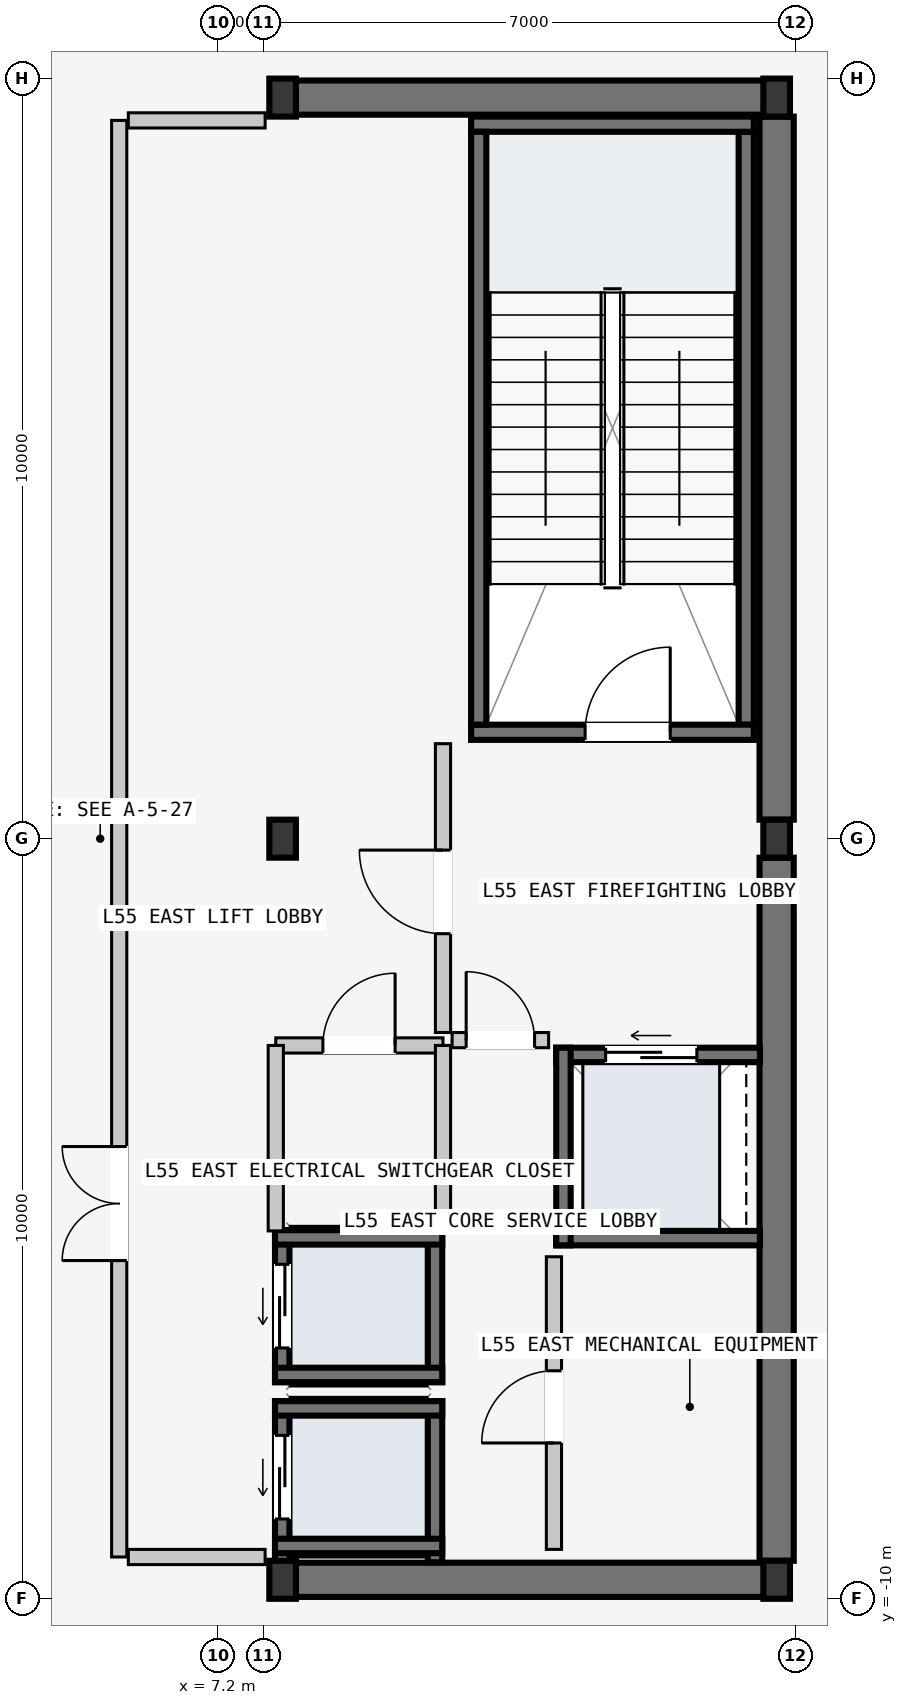
"""IFC4 building model, lengths in metres.
Left out: names, types, materials, properties, quantities, classifications, styles, units other than length and angle.
Written with IfcOpenShell. Run it as: python <this file> out.ifc"""

import sys

from ifc_helpers import new_model, si_unit, direction, frame, frame_2d, origin, origin_2d, place, context, subcontext, project, spatial, rectangle, i_section, extrude, element, fill, save


model = new_model("IFC4")
c1 = context("Model", 3, precision=1e-05, world=origin(), true_north=direction((0.0, 1.0)))
c2 = subcontext(c1, "Body", "Model", "MODEL_VIEW")
j1 = project(units=[si_unit("LENGTHUNIT", "METRE"), si_unit("PLANEANGLEUNIT", "RADIAN")], contexts=[c1])
p1 = place(None, origin())
s1 = spatial("IfcSite", under=j1, at=p1, CompositionType="ELEMENT")
p2 = place(p1, origin())
s2 = spatial("IfcBuilding", under=s1, at=p2, CompositionType="ELEMENT")
p3 = place(p2, frame((0.0, 0.0, 209.1)))
s3 = spatial("IfcBuildingStorey", under=s2, at=p3, CompositionType="ELEMENT", Elevation=209.1)
for number, where, z_axis, x_axis in (
    (1, (8.07, -9.75, -0.2), (0.0, 0.0, 1.0), (1.0, 0.0, 0.0)),
    (2, (8.07, 9.75, -0.2), (0.0, 0.0, 1.0), (1.0, 0.0, 0.0)),
):
    element("IfcWall", number, at=place(p3, frame(where, z_axis=z_axis, x_axis=x_axis)), inside=s3, PredefinedType="SHEAR", context=c2, shape_type="SweptSolid", body=[
        extrude(rectangle(XDim=6.46, YDim=0.45, at=frame_2d((3.23, 0.0))), origin(), (0.0, 0.0, 1.0), 4.8),
    ])
for number, where, z_axis, x_axis in (
    (3, (14.55, -9.5, -0.2), (0.0, 0.0, 1.0), (0.0, 1.0, 0.0)),
    (4, (14.55, 0.25, -0.2), (0.0, 0.0, 1.0), (0.0, 1.0, 0.0)),
):
    element("IfcWall", number, at=place(p3, frame(where, z_axis=z_axis, x_axis=x_axis)), inside=s3, PredefinedType="SHEAR", context=c2, shape_type="SweptSolid", body=[
        extrude(rectangle(XDim=9.25, YDim=0.45, at=frame_2d((4.625, 0.0))), origin(), (0.0, 0.0, 1.0), 4.8),
    ])
p4 = place(p3, frame((14.15, 1.5, -0.2), z_axis=(0.0, 0.0, 1.0), x_axis=(0.0, 1.0, 0.0)))
e5 = element("IfcWall", 5, at=p4, inside=s3, PredefinedType="SOLIDWALL", context=c2, shape_type="SweptSolid", body=[
    extrude(rectangle(XDim=7.8, YDim=0.2, at=frame_2d((3.9, 0.0))), origin(), (0.0, 0.0, 1.0), 4.8),
])
p5 = place(p3, frame((10.53, 1.4, -0.2), z_axis=(0.0, 0.0, 1.0), x_axis=(1.0, 0.0, 0.0)))
e6 = element("IfcWall", 6, at=p5, inside=s3, PredefinedType="SOLIDWALL", context=c2, shape_type="SweptSolid", body=[
    extrude(rectangle(XDim=3.72, YDim=0.2, at=frame_2d((1.86, 0.0))), origin(), (0.0, 0.0, 1.0), 4.8),
])
p6 = place(p5, frame((1.5, 0.0, 0.2)))
e7 = element("IfcOpeningElement", 7, at=p6, cuts=e6, PredefinedType="OPENING", context=c2, shape_type="SweptSolid", body=[
    extrude(rectangle(XDim=1.12, YDim=2.18, at=frame_2d((0.56, 1.09))), frame((0.0, 0.11, 0.0), z_axis=(0.0, -1.0, 0.0), x_axis=(1.0, 0.0, 0.0)), (0.0, 0.0, 1.0), 0.22),
])
p7 = place(p3, frame((10.53, 9.4, -0.2), z_axis=(0.0, 0.0, 1.0), x_axis=(1.0, 0.0, 0.0)))
e8 = element("IfcWall", 8, at=p7, inside=s3, PredefinedType="SOLIDWALL", context=c2, shape_type="SweptSolid", body=[
    extrude(rectangle(XDim=3.72, YDim=0.2, at=frame_2d((1.86, 0.0))), origin(), (0.0, 0.0, 1.0), 4.8),
])
p8 = place(p3, frame((10.63, 1.5, -0.2), z_axis=(0.0, 0.0, 1.0), x_axis=(0.0, 1.0, 0.0)))
e9 = element("IfcWall", 9, at=p8, inside=s3, PredefinedType="SOLIDWALL", context=c2, shape_type="SweptSolid", body=[
    extrude(rectangle(XDim=7.8, YDim=0.2, at=frame_2d((3.9, 0.0))), origin(), (0.0, 0.0, 1.0), 4.8),
])
for number, where, z_axis, x_axis in (
    (10, (8.05, -9.75, 0.0), (0.0, 0.0, 1.0), (1.0, 0.0, 0.0)),
    (11, (8.05, 0.0, 0.0), (0.0, 0.0, 1.0), (1.0, 0.0, 0.0)),
    (12, (8.05, 9.75, 0.0), (0.0, 0.0, 1.0), (1.0, 0.0, 0.0)),
    (13, (14.55, -9.75, 0.0), (0.0, 0.0, 1.0), (1.0, 0.0, 0.0)),
    (14, (14.55, 0.0, 0.0), (0.0, 0.0, 1.0), (1.0, 0.0, 0.0)),
    (15, (14.55, 9.75, 0.0), (0.0, 0.0, 1.0), (1.0, 0.0, 0.0)),
):
    element("IfcColumn", number, at=place(p3, frame(where, z_axis=z_axis, x_axis=x_axis)), inside=s3, PredefinedType="COLUMN", context=c2, shape_type="SweptSolid", body=[
        extrude(i_section(OverallWidth=0.35, OverallDepth=0.5, WebThickness=0.02, FlangeThickness=0.032, at=origin_2d()), origin(), (0.0, 0.0, 1.0), 4.8),
    ])
p9 = place(p3, frame((8.045, -9.52, -0.2), z_axis=(0.0, 0.0, 1.0), x_axis=(0.0, 1.0, 0.0)))
e16 = element("IfcWall", 16, at=p9, inside=s3, PredefinedType="SOLIDWALL", context=c2, shape_type="SweptSolid", body=[
    extrude(rectangle(XDim=2.12, YDim=0.19, at=frame_2d((1.06, 0.0))), origin(), (0.0, 0.0, 1.0), 4.8),
])
p10 = place(p9, frame((0.57, 0.0, 0.2)))
e17 = element("IfcOpeningElement", 17, at=p10, cuts=e16, PredefinedType="OPENING", context=c2, shape_type="SweptSolid", body=[
    extrude(rectangle(XDim=1.1, YDim=2.2, at=frame_2d((0.55, 1.1))), frame((0.0, 0.105, 0.0), z_axis=(0.0, -1.0, 0.0), x_axis=(1.0, 0.0, 0.0)), (0.0, 0.0, 1.0), 0.21),
])
p11 = place(p3, frame((10.055, -9.52, -0.2), z_axis=(0.0, 0.0, 1.0), x_axis=(0.0, 1.0, 0.0)))
e18 = element("IfcWall", 18, at=p11, inside=s3, PredefinedType="SOLIDWALL", context=c2, shape_type="SweptSolid", body=[
    extrude(rectangle(XDim=2.12, YDim=0.19, at=frame_2d((1.06, 0.0))), origin(), (0.0, 0.0, 1.0), 4.8),
])
for number, where, z_axis, x_axis in (
    (19, (7.95, -7.495, -0.2), (0.0, 0.0, 1.0), (1.0, 0.0, 0.0)),
    (20, (7.95, -9.305, -0.2), (0.0, 0.0, 1.0), (1.0, 0.0, 0.0)),
):
    element("IfcWall", number, at=place(p3, frame(where, z_axis=z_axis, x_axis=x_axis)), inside=s3, PredefinedType="SOLIDWALL", context=c2, shape_type="SweptSolid", body=[
        extrude(rectangle(XDim=2.2, YDim=0.19, at=frame_2d((1.1, 0.0))), origin(), (0.0, 0.0, 1.0), 4.8),
    ])
p12 = place(p3, frame((8.045, -7.15, -0.2), z_axis=(0.0, 0.0, 1.0), x_axis=(0.0, 1.0, 0.0)))
e21 = element("IfcWall", 21, at=p12, inside=s3, PredefinedType="SOLIDWALL", context=c2, shape_type="SweptSolid", body=[
    extrude(rectangle(XDim=2.0, YDim=0.19, at=frame_2d((1.0, 0.0))), origin(), (0.0, 0.0, 1.0), 4.8),
])
p13 = place(p12, frame((0.45, 0.0, 0.2)))
e22 = element("IfcOpeningElement", 22, at=p13, cuts=e21, PredefinedType="OPENING", context=c2, shape_type="SweptSolid", body=[
    extrude(rectangle(XDim=1.1, YDim=2.2, at=frame_2d((0.55, 1.1))), frame((0.0, 0.105, 0.0), z_axis=(0.0, -1.0, 0.0), x_axis=(1.0, 0.0, 0.0)), (0.0, 0.0, 1.0), 0.21),
])
p14 = place(p3, frame((10.055, -7.15, -0.2), z_axis=(0.0, 0.0, 1.0), x_axis=(0.0, 1.0, 0.0)))
e23 = element("IfcWall", 23, at=p14, inside=s3, PredefinedType="SOLIDWALL", context=c2, shape_type="SweptSolid", body=[
    extrude(rectangle(XDim=2.0, YDim=0.19, at=frame_2d((1.0, 0.0))), origin(), (0.0, 0.0, 1.0), 4.8),
])
for number, where, z_axis, x_axis in (
    (24, (7.95, -5.245, -0.2), (0.0, 0.0, 1.0), (1.0, 0.0, 0.0)),
    (25, (7.95, -7.055, -0.2), (0.0, 0.0, 1.0), (1.0, 0.0, 0.0)),
):
    element("IfcWall", number, at=place(p3, frame(where, z_axis=z_axis, x_axis=x_axis)), inside=s3, PredefinedType="SOLIDWALL", context=c2, shape_type="SweptSolid", body=[
        extrude(rectangle(XDim=2.2, YDim=0.19, at=frame_2d((1.1, 0.0))), origin(), (0.0, 0.0, 1.0), 4.8),
    ])
p15 = place(p3, frame((11.65, -2.845, -0.2), z_axis=(0.0, 0.0, 1.0), x_axis=(1.0, 0.0, 0.0)))
e26 = element("IfcWall", 26, at=p15, inside=s3, PredefinedType="SOLIDWALL", context=c2, shape_type="SweptSolid", body=[
    extrude(rectangle(XDim=2.68, YDim=0.19, at=frame_2d((1.34, 0.0))), origin(), (0.0, 0.0, 1.0), 4.8),
])
p16 = place(p15, frame((0.65, 0.0, 0.2)))
e27 = element("IfcOpeningElement", 27, at=p16, cuts=e26, PredefinedType="OPENING", context=c2, shape_type="SweptSolid", body=[
    extrude(rectangle(XDim=1.2, YDim=2.2, at=frame_2d((0.6, 1.1))), frame((0.0, 0.105, 0.0), z_axis=(0.0, -1.0, 0.0), x_axis=(1.0, 0.0, 0.0)), (0.0, 0.0, 1.0), 0.21),
])
p17 = place(p3, frame((11.65, -5.255, -0.2), z_axis=(0.0, 0.0, 1.0), x_axis=(1.0, 0.0, 0.0)))
e28 = element("IfcWall", 28, at=p17, inside=s3, PredefinedType="SOLIDWALL", context=c2, shape_type="SweptSolid", body=[
    extrude(rectangle(XDim=2.68, YDim=0.19, at=frame_2d((1.34, 0.0))), origin(), (0.0, 0.0, 1.0), 4.8),
])
p18 = place(p3, frame((11.745, -5.35, -0.2), z_axis=(0.0, 0.0, 1.0), x_axis=(0.0, 1.0, 0.0)))
e29 = element("IfcWall", 29, at=p18, inside=s3, PredefinedType="SOLIDWALL", context=c2, shape_type="SweptSolid", body=[
    extrude(rectangle(XDim=2.6, YDim=0.19, at=frame_2d((1.3, 0.0))), origin(), (0.0, 0.0, 1.0), 4.8),
])
p19 = place(p3, frame((5.9, -9.45, 0.0), z_axis=(0.0, 0.0, 1.0), x_axis=(0.0, 1.0, 0.0)))
e30 = element("IfcWall", 30, at=p19, inside=s3, PredefinedType="PARTITIONING", context=c2, shape_type="SweptSolid", body=[
    extrude(rectangle(XDim=18.9, YDim=0.2, at=frame_2d((9.45, 0.0))), origin(), (0.0, 0.0, 1.0), 4.6),
])
p20 = place(p19, frame((3.9, 0.0, 0.0)))
e31 = element("IfcOpeningElement", 31, at=p20, cuts=e30, PredefinedType="OPENING", context=c2, shape_type="SweptSolid", body=[
    extrude(rectangle(XDim=1.5, YDim=2.2, at=frame_2d((0.75, 1.1))), frame((0.0, 0.11, 0.0), z_axis=(0.0, -1.0, 0.0), x_axis=(1.0, 0.0, 0.0)), (0.0, 0.0, 1.0), 0.22),
])
for number, where, z_axis, x_axis in (
    (32, (6.02, -9.45, 0.0), (0.0, 0.0, 1.0), (1.0, 0.0, 0.0)),
    (33, (6.02, 9.45, 0.0), (0.0, 0.0, 1.0), (1.0, 0.0, 0.0)),
):
    element("IfcWall", number, at=place(p3, frame(where, z_axis=z_axis, x_axis=x_axis)), inside=s3, PredefinedType="PARTITIONING", context=c2, shape_type="SweptSolid", body=[
        extrude(rectangle(XDim=1.8, YDim=0.2, at=frame_2d((0.9, 0.0))), origin(), (0.0, 0.0, 1.0), 2.96),
    ])
p21 = place(p3, frame((10.16, -2.55, 0.0), z_axis=(0.0, 0.0, 1.0), x_axis=(0.0, 1.0, 0.0)))
e34 = element("IfcWall", 34, at=p21, inside=s3, PredefinedType="PARTITIONING", context=c2, shape_type="SweptSolid", body=[
    extrude(rectangle(XDim=3.8, YDim=0.2, at=frame_2d((1.9, 0.0))), origin(), (0.0, 0.0, 1.0), 4.6),
])
p22 = place(p21, frame((1.3, 0.0, 0.0)))
e35 = element("IfcOpeningElement", 35, at=p22, cuts=e34, PredefinedType="OPENING", context=c2, shape_type="SweptSolid", body=[
    extrude(rectangle(XDim=1.1, YDim=2.15, at=frame_2d((0.55, 1.075))), frame((0.0, 0.11, 0.0), z_axis=(0.0, -1.0, 0.0), x_axis=(1.0, 0.0, 0.0)), (0.0, 0.0, 1.0), 0.22),
])
p23 = place(p3, frame((10.28, -2.65, 0.0), z_axis=(0.0, 0.0, 1.0), x_axis=(1.0, 0.0, 0.0)))
e36 = element("IfcWall", 36, at=p23, inside=s3, PredefinedType="PARTITIONING", context=c2, shape_type="SweptSolid", body=[
    extrude(rectangle(XDim=1.27, YDim=0.2, at=frame_2d((0.635, 0.0))), origin(), (0.0, 0.0, 1.0), 4.6),
])
p24 = place(p23, frame((0.185, 0.0, 0.0)))
e37 = element("IfcOpeningElement", 37, at=p24, cuts=e36, PredefinedType="OPENING", context=c2, shape_type="SweptSolid", body=[
    extrude(rectangle(XDim=0.9, YDim=2.15, at=frame_2d((0.45, 1.075))), frame((0.0, 0.11, 0.0), z_axis=(0.0, -1.0, 0.0), x_axis=(1.0, 0.0, 0.0)), (0.0, 0.0, 1.0), 0.22),
])
p25 = place(p3, frame((7.96, -2.72, 0.0), z_axis=(0.0, 0.0, 1.0), x_axis=(1.0, 0.0, 0.0)))
e38 = element("IfcWall", 38, at=p25, inside=s3, PredefinedType="PARTITIONING", context=c2, shape_type="SweptSolid", body=[
    extrude(rectangle(XDim=2.2, YDim=0.2, at=frame_2d((1.1, 0.0))), origin(), (0.0, 0.0, 1.0), 4.6),
])
p26 = place(p25, frame((0.62, 0.0, 0.0)))
e39 = element("IfcOpeningElement", 39, at=p26, cuts=e38, PredefinedType="OPENING", context=c2, shape_type="SweptSolid", body=[
    extrude(rectangle(XDim=0.95, YDim=2.1, at=frame_2d((0.475, 1.05))), frame((0.0, 0.11, 0.0), z_axis=(0.0, -1.0, 0.0), x_axis=(1.0, 0.0, 0.0)), (0.0, 0.0, 1.0), 0.22),
])
for number, where, z_axis, x_axis in (
    (40, (7.96, -5.16, 0.0), (0.0, 0.0, 1.0), (0.0, 1.0, 0.0)),
    (41, (10.16, -5.16, 0.0), (0.0, 0.0, 1.0), (0.0, 1.0, 0.0)),
):
    element("IfcWall", number, at=place(p3, frame(where, z_axis=z_axis, x_axis=x_axis)), inside=s3, PredefinedType="PARTITIONING", context=c2, shape_type="SweptSolid", body=[
        extrude(rectangle(XDim=2.44, YDim=0.2, at=frame_2d((1.22, 0.0))), origin(), (0.0, 0.0, 1.0), 4.6),
    ])
p27 = place(p3, frame((11.62, -9.35, 0.0), z_axis=(0.0, 0.0, 1.0), x_axis=(0.0, 1.0, 0.0)))
e42 = element("IfcWall", 42, at=p27, inside=s3, PredefinedType="PARTITIONING", context=c2, shape_type="SweptSolid", body=[
    extrude(rectangle(XDim=3.85, YDim=0.2, at=frame_2d((1.925, 0.0))), origin(), (0.0, 0.0, 1.0), 4.6),
])
p28 = place(p27, frame((1.4, 0.0, 0.0)))
e43 = element("IfcOpeningElement", 43, at=p28, cuts=e42, PredefinedType="OPENING", context=c2, shape_type="SweptSolid", body=[
    extrude(rectangle(XDim=0.95, YDim=2.1, at=frame_2d((0.475, 1.05))), frame((0.0, 0.11, 0.0), z_axis=(0.0, -1.0, 0.0), x_axis=(1.0, 0.0, 0.0)), (0.0, 0.0, 1.0), 0.22),
])
p29 = place(p6, origin())
e44 = element("IfcDoor", 44, at=p29, inside=s3, OperationType="SINGLE_SWING_RIGHT", PredefinedType="DOOR", context=c2, shape_type="SweptSolid", body=[
    extrude(rectangle(XDim=1.12, YDim=2.18, at=frame_2d((0.56, 1.09))), frame((0.0, 0.025, 0.0), z_axis=(0.0, -1.0, 0.0), x_axis=(1.0, 0.0, 0.0)), (0.0, 0.0, 1.0), 0.05),
])
fill(e7, e44)
p30 = place(p10, origin())
e45 = element("IfcDoor", 45, at=p30, inside=s3, OperationType="SLIDING_TO_LEFT", PredefinedType="DOOR", context=c2, shape_type="SweptSolid", body=[
    extrude(rectangle(XDim=1.1, YDim=2.2, at=frame_2d((0.55, 1.1))), frame((0.0, 0.025, 0.0), z_axis=(0.0, -1.0, 0.0), x_axis=(1.0, 0.0, 0.0)), (0.0, 0.0, 1.0), 0.05),
])
fill(e17, e45)
p31 = place(p13, origin())
e46 = element("IfcDoor", 46, at=p31, inside=s3, OperationType="SLIDING_TO_LEFT", PredefinedType="DOOR", context=c2, shape_type="SweptSolid", body=[
    extrude(rectangle(XDim=1.1, YDim=2.2, at=frame_2d((0.55, 1.1))), frame((0.0, 0.025, 0.0), z_axis=(0.0, -1.0, 0.0), x_axis=(1.0, 0.0, 0.0)), (0.0, 0.0, 1.0), 0.05),
])
fill(e22, e46)
p32 = place(p16, origin())
e47 = element("IfcDoor", 47, at=p32, inside=s3, OperationType="SLIDING_TO_LEFT", PredefinedType="DOOR", context=c2, shape_type="SweptSolid", body=[
    extrude(rectangle(XDim=1.2, YDim=2.2, at=frame_2d((0.6, 1.1))), frame((0.0, 0.025, 0.0), z_axis=(0.0, -1.0, 0.0), x_axis=(1.0, 0.0, 0.0)), (0.0, 0.0, 1.0), 0.05),
])
fill(e27, e47)
p33 = place(p20, origin())
e48 = element("IfcDoor", 48, at=p33, inside=s3, OperationType="DOUBLE_DOOR_SINGLE_SWING", PredefinedType="DOOR", context=c2, shape_type="SweptSolid", body=[
    extrude(rectangle(XDim=1.5, YDim=2.2, at=frame_2d((0.75, 1.1))), frame((0.0, 0.025, 0.0), z_axis=(0.0, -1.0, 0.0), x_axis=(1.0, 0.0, 0.0)), (0.0, 0.0, 1.0), 0.05),
])
fill(e31, e48)
p34 = place(p22, origin())
e49 = element("IfcDoor", 49, at=p34, inside=s3, OperationType="SINGLE_SWING_RIGHT", PredefinedType="DOOR", context=c2, shape_type="SweptSolid", body=[
    extrude(rectangle(XDim=1.1, YDim=2.15, at=frame_2d((0.55, 1.075))), frame((0.0, 0.025, 0.0), z_axis=(0.0, -1.0, 0.0), x_axis=(1.0, 0.0, 0.0)), (0.0, 0.0, 1.0), 0.05),
])
fill(e35, e49)
p35 = place(p24, origin())
e50 = element("IfcDoor", 50, at=p35, inside=s3, OperationType="SINGLE_SWING_LEFT", PredefinedType="DOOR", context=c2, shape_type="SweptSolid", body=[
    extrude(rectangle(XDim=0.9, YDim=2.15, at=frame_2d((0.45, 1.075))), frame((0.0, 0.025, 0.0), z_axis=(0.0, -1.0, 0.0), x_axis=(1.0, 0.0, 0.0)), (0.0, 0.0, 1.0), 0.05),
])
fill(e37, e50)
p36 = place(p26, origin())
e51 = element("IfcDoor", 51, at=p36, inside=s3, OperationType="SINGLE_SWING_RIGHT", PredefinedType="DOOR", context=c2, shape_type="SweptSolid", body=[
    extrude(rectangle(XDim=0.95, YDim=2.1, at=frame_2d((0.475, 1.05))), frame((0.0, 0.025, 0.0), z_axis=(0.0, -1.0, 0.0), x_axis=(1.0, 0.0, 0.0)), (0.0, 0.0, 1.0), 0.05),
])
fill(e39, e51)
p37 = place(p28, origin())
e52 = element("IfcDoor", 52, at=p37, inside=s3, OperationType="SINGLE_SWING_LEFT", PredefinedType="DOOR", context=c2, shape_type="SweptSolid", body=[
    extrude(rectangle(XDim=0.95, YDim=2.1, at=frame_2d((0.475, 1.05))), frame((0.0, 0.025, 0.0), z_axis=(0.0, -1.0, 0.0), x_axis=(1.0, 0.0, 0.0)), (0.0, 0.0, 1.0), 0.05),
])
fill(e43, e52)
save(model, sys.argv[1])
